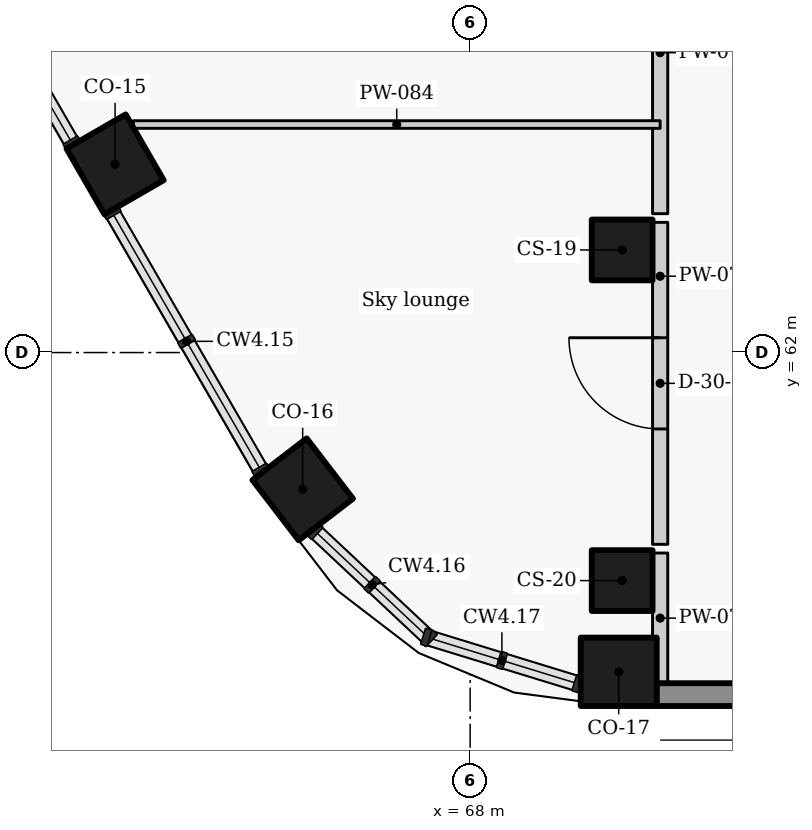
"""IFC4 building model, lengths in metres.
Left out: names, types, materials, properties, quantities, classifications, styles, units other than length and angle.
Written with IfcOpenShell. Run it as: python <this file> out.ifc"""

import sys

from ifc_helpers import new_model, si_unit, direction, frame, frame_2d, origin, origin_2d, place, context, subcontext, project, spatial, rectangle, extrude, element, fill, save


model = new_model("IFC4")
c1 = context("Model", 3, precision=1e-05, world=origin(), true_north=direction((0.0, 1.0)))
c2 = subcontext(c1, "Body", "Model", "MODEL_VIEW")
j1 = project(units=[si_unit("LENGTHUNIT", "METRE"), si_unit("PLANEANGLEUNIT", "RADIAN")], contexts=[c1])
p1 = place(None, origin())
s1 = spatial("IfcSite", under=j1, at=p1, CompositionType="ELEMENT")
p2 = place(p1, origin())
s2 = spatial("IfcBuilding", under=s1, at=p2, CompositionType="ELEMENT")
p3 = place(p2, frame((0.0, 0.0, 272.4)))
s3 = spatial("IfcBuildingStorey", under=s2, at=p3, CompositionType="ELEMENT", Elevation=272.4)
for number, where, z_axis, x_axis in (
    (1, (63.329, 64.475, 0.0), (0.0, 0.0, 1.0), (0.5, -0.866, 0.0)),
    (2, (65.797, 60.2, 0.0), (0.0, 0.0, 1.0), (0.609, -0.793, 0.0)),
    (3, (69.955, 57.8, 0.0), (0.0, 0.0, 1.0), (1.0, 0.0, 0.0)),
):
    element("IfcColumn", number, at=place(p3, frame(where, z_axis=z_axis, x_axis=x_axis)), inside=s3, PredefinedType="COLUMN", context=c2, shape_type="SweptSolid", body=[
        extrude(rectangle(XDim=1.0, YDim=0.9, at=origin_2d()), origin(), (0.0, 0.0, 1.0), 3.6),
    ])
for number, where, z_axis, x_axis in (
    (4, (70.0, 63.35, 0.0), (0.0, 0.0, 1.0), (0.0, -1.0, 0.0)),
    (5, (70.0, 59.0, 0.0), (0.0, 0.0, 1.0), (0.0, -1.0, 0.0)),
):
    element("IfcColumn", number, at=place(p3, frame(where, z_axis=z_axis, x_axis=x_axis)), inside=s3, PredefinedType="COLUMN", context=c2, shape_type="SweptSolid", body=[
        extrude(rectangle(XDim=0.8, YDim=0.8, at=origin_2d()), origin(), (0.0, 0.0, 1.0), 3.6),
    ])
p4 = place(p3, frame((70.451, 57.5, 0.0), z_axis=(0.0, 0.0, 1.0), x_axis=(1.0, 0.0, 0.0)))
e6 = element("IfcWall", 6, at=p4, inside=s3, PredefinedType="SOLIDWALL", context=c2, shape_type="SweptSolid", body=[
    extrude(rectangle(XDim=19.093, YDim=0.3, at=frame_2d((9.546, 0.0))), origin(), (0.0, 0.0, 1.0), 2.725),
])
p5 = place(p3, frame((70.5, 57.65, 0.0), z_axis=(0.0, 0.0, 1.0), x_axis=(0.0, 1.0, 0.0)))
e7 = element("IfcWall", 7, at=p5, inside=s3, PredefinedType="PARTITIONING", context=c2, shape_type="SweptSolid", body=[
    extrude(rectangle(XDim=1.713, YDim=0.2, at=frame_2d((0.856, 0.0))), origin(), (0.0, 0.0, 1.0), 3.325),
])
p6 = place(p3, frame((70.5, 59.477, 0.0), z_axis=(0.0, 0.0, 1.0), x_axis=(0.0, 1.0, 0.0)))
e8 = element("IfcWall", 8, at=p6, inside=s3, PredefinedType="PARTITIONING", context=c2, shape_type="SweptSolid", body=[
    extrude(rectangle(XDim=4.236, YDim=0.2, at=frame_2d((2.118, 0.0))), origin(), (0.0, 0.0, 1.0), 3.325),
])
p7 = place(p6, frame((1.518, 0.0, 0.0)))
e9 = element("IfcOpeningElement", 9, at=p7, cuts=e8, PredefinedType="OPENING", context=c2, shape_type="SweptSolid", body=[
    extrude(rectangle(XDim=1.2, YDim=2.1, at=frame_2d((0.6, 1.05))), frame((0.0, 0.11, 0.0), z_axis=(0.0, -1.0, 0.0), x_axis=(1.0, 0.0, 0.0)), (0.0, 0.0, 1.0), 0.22),
])
p8 = place(p3, frame((70.5, 63.827, 0.0), z_axis=(0.0, 0.0, 1.0), x_axis=(0.0, 1.0, 0.0)))
e10 = element("IfcWall", 10, at=p8, inside=s3, PredefinedType="PARTITIONING", context=c2, shape_type="SweptSolid", body=[
    extrude(rectangle(XDim=4.236, YDim=0.2, at=frame_2d((2.118, 0.0))), origin(), (0.0, 0.0, 1.0), 3.325),
])
p9 = place(p3, frame((63.569, 65.0, 0.0), z_axis=(0.0, 0.0, 1.0), x_axis=(1.0, 0.0, 0.0)))
e11 = element("IfcWall", 11, at=p9, inside=s3, PredefinedType="PARTITIONING", context=c2, shape_type="SweptSolid", body=[
    extrude(rectangle(XDim=6.931, YDim=0.1, at=frame_2d((3.466, 0.0))), origin(), (0.0, 0.0, 1.0), 2.805),
])
p10 = place(p7, origin())
e12 = element("IfcDoor", 12, at=p10, inside=s3, OperationType="SINGLE_SWING_RIGHT", PredefinedType="DOOR", context=c2, shape_type="SweptSolid", body=[
    extrude(rectangle(XDim=1.2, YDim=2.1, at=frame_2d((0.6, 1.05))), frame((0.0, 0.025, 0.0), z_axis=(0.0, -1.0, 0.0), x_axis=(1.0, 0.0, 0.0)), (0.0, 0.0, 1.0), 0.05),
])
fill(e9, e12)
save(model, sys.argv[1])
